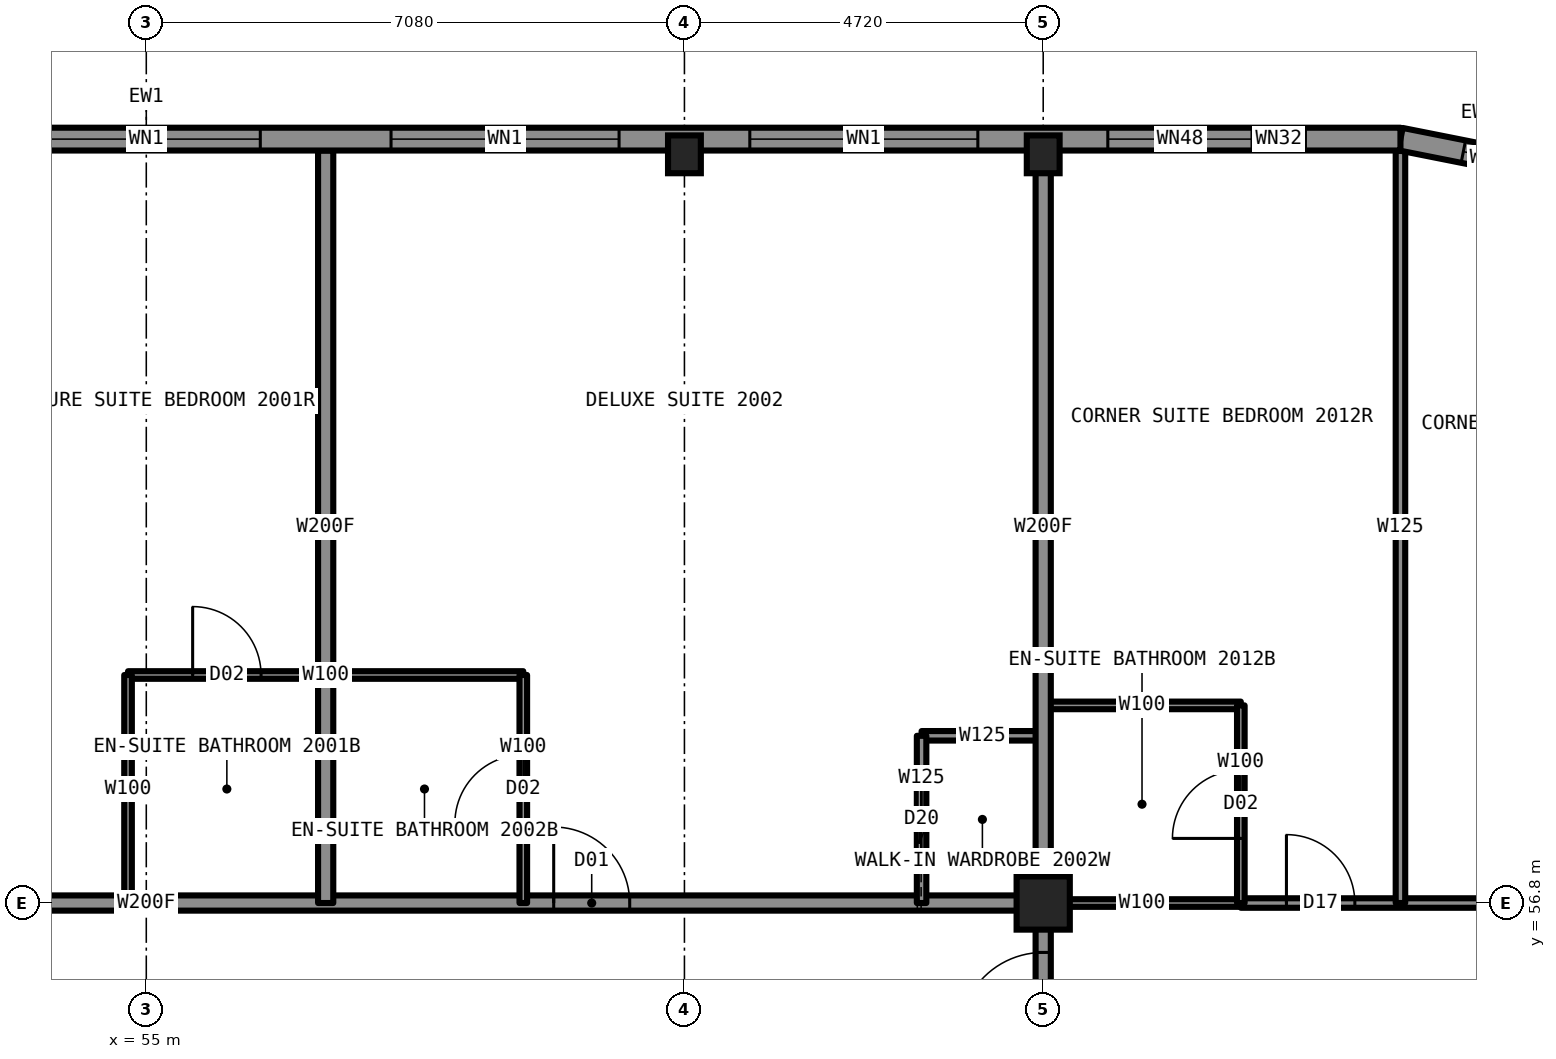
"""IFC4 building model, lengths in metres.
Left out: names, types, materials, properties, quantities, classifications, styles, units other than length and angle.
Written with IfcOpenShell. Run it as: python <this file> out.ifc"""

import sys

from ifc_helpers import new_model, si_unit, direction, frame, frame_2d, origin, origin_2d, place, context, subcontext, project, spatial, rectangle, hollow_rectangle, i_section, extrude, element, fill, save


model = new_model("IFC4")
c1 = context("Model", 3, precision=1e-05, world=origin(), true_north=direction((0.0, 1.0)))
c2 = subcontext(c1, "Body", "Model", "MODEL_VIEW")
j1 = project(units=[si_unit("LENGTHUNIT", "METRE"), si_unit("PLANEANGLEUNIT", "RADIAN")], contexts=[c1])
p1 = place(None, origin())
s1 = spatial("IfcSite", under=j1, at=p1, CompositionType="ELEMENT")
p2 = place(p1, origin())
s2 = spatial("IfcBuilding", under=s1, at=p2, CompositionType="ELEMENT")
p3 = place(p2, frame((0.0, 0.0, 70.5)))
s3 = spatial("IfcBuildingStorey", under=s2, at=p3, CompositionType="ELEMENT", Elevation=70.5)
for number, where, z_axis, x_axis in (
    (1, (62.08, 66.65, 0.0), (0.0, 0.0, 1.0), (1.0, 0.0, 0.0)),
    (2, (66.8, 66.65, 0.0), (0.0, 0.0, 1.0), (1.0, 0.0, 0.0)),
):
    element("IfcColumn", number, at=place(p3, frame(where, z_axis=z_axis, x_axis=x_axis)), inside=s3, PredefinedType="COLUMN", context=c2, shape_type="SweptSolid", body=[
        extrude(i_section(OverallWidth=0.432, OverallDepth=0.498, WebThickness=0.056, FlangeThickness=0.089, at=origin_2d()), origin(), (0.0, 0.0, 1.0), 3.5),
    ])
p4 = place(p3, frame((66.8, 56.8, 0.0), z_axis=(0.0, 0.0, 1.0), x_axis=(1.0, 0.0, 0.0)))
e3 = element("IfcColumn", 3, at=p4, inside=s3, PredefinedType="COLUMN", context=c2, shape_type="SweptSolid", body=[
    extrude(hollow_rectangle(XDim=0.7, YDim=0.7, WallThickness=0.06, at=origin_2d()), origin(), (0.0, 0.0, 1.0), 3.5),
])
p5 = place(p3, frame((66.8, 56.8, 0.0), z_axis=(0.0, 0.0, 1.0), x_axis=(1.0, 0.0, 0.0)))
e4 = element("IfcWall", 4, at=p5, inside=s3, PredefinedType="PARTITIONING", context=c2, shape_type="SweptSolid", body=[
    extrude(rectangle(XDim=2.6, YDim=0.1, at=frame_2d((1.3, 0.0))), origin(), (0.0, 0.0, 1.0), 2.573),
])
p6 = place(p3, frame((43.2, 56.8, 0.0), z_axis=(0.0, 0.0, 1.0), x_axis=(1.0, 0.0, 0.0)))
e5 = element("IfcWall", 5, at=p6, inside=s3, PredefinedType="PARTITIONING", context=c2, shape_type="SweptSolid", body=[
    extrude(rectangle(XDim=23.6, YDim=0.2, at=frame_2d((11.8, 0.0))), origin(), (0.0, 0.0, 1.0), 3.33),
])
p7 = place(p6, frame((1.85, 0.0, 0.0)))
e6 = element("IfcOpeningElement", 6, at=p7, cuts=e5, PredefinedType="OPENING", context=c2, shape_type="SweptSolid", body=[
    extrude(rectangle(XDim=1.1, YDim=2.2, at=frame_2d((0.55, 1.1))), frame((0.0, 0.11, 0.0), z_axis=(0.0, -1.0, 0.0), x_axis=(1.0, 0.0, 0.0)), (0.0, 0.0, 1.0), 0.22),
])
p8 = place(p6, frame((17.16, 0.0, 0.0)))
e7 = element("IfcOpeningElement", 7, at=p8, cuts=e5, PredefinedType="OPENING", context=c2, shape_type="SweptSolid", body=[
    extrude(rectangle(XDim=1.0, YDim=2.2, at=frame_2d((0.5, 1.1))), frame((0.0, 0.11, 0.0), z_axis=(0.0, -1.0, 0.0), x_axis=(1.0, 0.0, 0.0)), (0.0, 0.0, 1.0), 0.22),
])
p9 = place(p3, frame((69.4, 56.8, 0.0), z_axis=(0.0, 0.0, 1.0), x_axis=(1.0, 0.0, 0.0)))
e8 = element("IfcWall", 8, at=p9, inside=s3, PredefinedType="PARTITIONING", context=c2, shape_type="SweptSolid", body=[
    extrude(rectangle(XDim=7.3, YDim=0.125, at=frame_2d((3.65, 0.0))), origin(), (0.0, 0.0, 1.0), 2.573),
])
p10 = place(p9, frame((0.6, 0.0, 0.0)))
e9 = element("IfcOpeningElement", 9, at=p10, cuts=e8, PredefinedType="OPENING", context=c2, shape_type="SweptSolid", body=[
    extrude(rectangle(XDim=0.9, YDim=2.2, at=frame_2d((0.45, 1.1))), frame((0.0, 0.073, 0.0), z_axis=(0.0, -1.0, 0.0), x_axis=(1.0, 0.0, 0.0)), (0.0, 0.0, 1.0), 0.145),
])
p11 = place(p9, frame((4.4, 0.0, 0.0)))
e10 = element("IfcOpeningElement", 10, at=p11, cuts=e8, PredefinedType="OPENING", context=c2, shape_type="SweptSolid", body=[
    extrude(rectangle(XDim=0.9, YDim=2.2, at=frame_2d((0.45, 1.1))), frame((0.0, 0.073, 0.0), z_axis=(0.0, -1.0, 0.0), x_axis=(1.0, 0.0, 0.0)), (0.0, 0.0, 1.0), 0.145),
])
p12 = place(p3, frame((65.2, 59.0, 0.0), z_axis=(0.0, 0.0, 1.0), x_axis=(1.0, 0.0, 0.0)))
e11 = element("IfcWall", 11, at=p12, inside=s3, PredefinedType="PARTITIONING", context=c2, shape_type="SweptSolid", body=[
    extrude(rectangle(XDim=1.6, YDim=0.125, at=frame_2d((0.8, 0.0))), origin(), (0.0, 0.0, 1.0), 3.33),
])
p13 = place(p3, frame((66.8, 59.4, 0.0), z_axis=(0.0, 0.0, 1.0), x_axis=(1.0, 0.0, 0.0)))
e12 = element("IfcWall", 12, at=p13, inside=s3, PredefinedType="PARTITIONING", context=c2, shape_type="SweptSolid", body=[
    extrude(rectangle(XDim=2.6, YDim=0.1, at=frame_2d((1.3, 0.0))), origin(), (0.0, 0.0, 1.0), 3.33),
])
p14 = place(p3, frame((54.76, 59.8, 0.0), z_axis=(0.0, 0.0, 1.0), x_axis=(1.0, 0.0, 0.0)))
e13 = element("IfcWall", 13, at=p14, inside=s3, PredefinedType="PARTITIONING", context=c2, shape_type="SweptSolid", body=[
    extrude(rectangle(XDim=5.2, YDim=0.1, at=frame_2d((2.6, 0.0))), origin(), (0.0, 0.0, 1.0), 3.33),
])
p15 = place(p14, frame((0.85, 0.0, 0.0)))
e14 = element("IfcOpeningElement", 14, at=p15, cuts=e13, PredefinedType="OPENING", context=c2, shape_type="SweptSolid", body=[
    extrude(rectangle(XDim=0.9, YDim=2.1, at=frame_2d((0.45, 1.05))), frame((0.0, 0.06, 0.0), z_axis=(0.0, -1.0, 0.0), x_axis=(1.0, 0.0, 0.0)), (0.0, 0.0, 1.0), 0.12),
])
p16 = place(p3, frame((54.76, 56.8, 0.0), z_axis=(0.0, 0.0, 1.0), x_axis=(0.0, 1.0, 0.0)))
e15 = element("IfcWall", 15, at=p16, inside=s3, PredefinedType="PARTITIONING", context=c2, shape_type="SweptSolid", body=[
    extrude(rectangle(XDim=3.0, YDim=0.1, at=frame_2d((1.5, 0.0))), origin(), (0.0, 0.0, 1.0), 3.33),
])
p17 = place(p3, frame((65.2, 56.8, 0.0), z_axis=(0.0, 0.0, 1.0), x_axis=(0.0, 1.0, 0.0)))
e16 = element("IfcWall", 16, at=p17, inside=s3, PredefinedType="PARTITIONING", context=c2, shape_type="SweptSolid", body=[
    extrude(rectangle(XDim=2.2, YDim=0.125, at=frame_2d((1.1, 0.0))), origin(), (0.0, 0.0, 1.0), 3.33),
])
p18 = place(p17, frame((0.7, 0.0, 0.0)))
e17 = element("IfcOpeningElement", 17, at=p18, cuts=e16, PredefinedType="OPENING", context=c2, shape_type="SweptSolid", body=[
    extrude(rectangle(XDim=0.8, YDim=2.1, at=frame_2d((0.4, 1.05))), frame((0.0, 0.073, 0.0), z_axis=(0.0, -1.0, 0.0), x_axis=(1.0, 0.0, 0.0)), (0.0, 0.0, 1.0), 0.145),
])
p19 = place(p3, frame((66.8, 33.2, 0.0), z_axis=(0.0, 0.0, 1.0), x_axis=(0.0, 1.0, 0.0)))
e18 = element("IfcWall", 18, at=p19, inside=s3, PredefinedType="PARTITIONING", context=c2, shape_type="SweptSolid", body=[
    extrude(rectangle(XDim=23.6, YDim=0.2, at=frame_2d((11.8, 0.0))), origin(), (0.0, 0.0, 1.0), 3.33),
])
p20 = place(p19, frame((6.98, 0.0, 0.0)))
e19 = element("IfcOpeningElement", 19, at=p20, cuts=e18, PredefinedType="OPENING", context=c2, shape_type="SweptSolid", body=[
    extrude(rectangle(XDim=1.0, YDim=2.2, at=frame_2d((0.5, 1.1))), frame((0.0, 0.11, 0.0), z_axis=(0.0, -1.0, 0.0), x_axis=(1.0, 0.0, 0.0)), (0.0, 0.0, 1.0), 0.22),
])
p21 = place(p19, frame((12.44, 0.0, 0.0)))
e20 = element("IfcOpeningElement", 20, at=p21, cuts=e18, PredefinedType="OPENING", context=c2, shape_type="SweptSolid", body=[
    extrude(rectangle(XDim=1.0, YDim=2.2, at=frame_2d((0.5, 1.1))), frame((0.0, 0.11, 0.0), z_axis=(0.0, -1.0, 0.0), x_axis=(1.0, 0.0, 0.0)), (0.0, 0.0, 1.0), 0.22),
])
p22 = place(p19, frame((21.85, 0.0, 0.0)))
e21 = element("IfcOpeningElement", 21, at=p22, cuts=e18, PredefinedType="OPENING", context=c2, shape_type="SweptSolid", body=[
    extrude(rectangle(XDim=1.1, YDim=2.2, at=frame_2d((0.55, 1.1))), frame((0.0, 0.11, 0.0), z_axis=(0.0, -1.0, 0.0), x_axis=(1.0, 0.0, 0.0)), (0.0, 0.0, 1.0), 0.22),
])
p23 = place(p19, frame((0.66, 0.0, 0.0)))
e22 = element("IfcOpeningElement", 22, at=p23, cuts=e18, PredefinedType="OPENING", context=c2, shape_type="SweptSolid", body=[
    extrude(rectangle(XDim=1.1, YDim=2.2, at=frame_2d((0.55, 1.1))), frame((0.0, 0.11, 0.0), z_axis=(0.0, -1.0, 0.0), x_axis=(1.0, 0.0, 0.0)), (0.0, 0.0, 1.0), 0.22),
])
p24 = place(p3, frame((66.8, 56.8, 0.0), z_axis=(0.0, 0.0, 1.0), x_axis=(0.0, 1.0, 0.0)))
e23 = element("IfcWall", 23, at=p24, inside=s3, PredefinedType="PARTITIONING", context=c2, shape_type="SweptSolid", body=[
    extrude(rectangle(XDim=9.9, YDim=0.2, at=frame_2d((4.95, 0.0))), origin(), (0.0, 0.0, 1.0), 2.573),
])
p25 = place(p3, frame((69.4, 56.8, 0.0), z_axis=(0.0, 0.0, 1.0), x_axis=(0.0, 1.0, 0.0)))
e24 = element("IfcWall", 24, at=p25, inside=s3, PredefinedType="PARTITIONING", context=c2, shape_type="SweptSolid", body=[
    extrude(rectangle(XDim=2.6, YDim=0.1, at=frame_2d((1.3, 0.0))), origin(), (0.0, 0.0, 1.0), 3.33),
])
p26 = place(p25, frame((0.85, 0.0, 0.0)))
e25 = element("IfcOpeningElement", 25, at=p26, cuts=e24, PredefinedType="OPENING", context=c2, shape_type="SweptSolid", body=[
    extrude(rectangle(XDim=0.9, YDim=2.1, at=frame_2d((0.45, 1.05))), frame((0.0, 0.06, 0.0), z_axis=(0.0, -1.0, 0.0), x_axis=(1.0, 0.0, 0.0)), (0.0, 0.0, 1.0), 0.12),
])
p27 = place(p3, frame((71.5, 56.8, 0.0), z_axis=(0.0, 0.0, 1.0), x_axis=(0.0, 1.0, 0.0)))
e26 = element("IfcWall", 26, at=p27, inside=s3, PredefinedType="PARTITIONING", context=c2, shape_type="SweptSolid", body=[
    extrude(rectangle(XDim=9.894, YDim=0.125, at=frame_2d((4.947, 0.0))), origin(), (0.0, 0.0, 1.0), 3.33),
])
p28 = place(p3, frame((57.36, 56.8, 0.0), z_axis=(0.0, 0.0, 1.0), x_axis=(0.0, 1.0, 0.0)))
e27 = element("IfcWall", 27, at=p28, inside=s3, PredefinedType="PARTITIONING", context=c2, shape_type="SweptSolid", body=[
    extrude(rectangle(XDim=9.9, YDim=0.2, at=frame_2d((4.95, 0.0))), origin(), (0.0, 0.0, 1.0), 3.33),
])
p29 = place(p3, frame((59.96, 56.8, 0.0), z_axis=(0.0, 0.0, 1.0), x_axis=(0.0, 1.0, 0.0)))
e28 = element("IfcWall", 28, at=p29, inside=s3, PredefinedType="PARTITIONING", context=c2, shape_type="SweptSolid", body=[
    extrude(rectangle(XDim=3.0, YDim=0.1, at=frame_2d((1.5, 0.0))), origin(), (0.0, 0.0, 1.0), 3.33),
])
p30 = place(p29, frame((1.05, 0.0, 0.0)))
e29 = element("IfcOpeningElement", 29, at=p30, cuts=e28, PredefinedType="OPENING", context=c2, shape_type="SweptSolid", body=[
    extrude(rectangle(XDim=0.9, YDim=2.1, at=frame_2d((0.45, 1.05))), frame((0.0, 0.06, 0.0), z_axis=(0.0, -1.0, 0.0), x_axis=(1.0, 0.0, 0.0)), (0.0, 0.0, 1.0), 0.12),
])
p31 = place(p3, frame((73.547, 66.443, 0.0), z_axis=(0.0, 0.0, 1.0), x_axis=(-0.980787050784, 0.195081421501, 0.0)))
e30 = element("IfcWall", 30, at=p31, inside=s3, PredefinedType="SOLIDWALL", context=c2, shape_type="SweptSolid", body=[
    extrude(rectangle(XDim=2.087, YDim=0.3, at=frame_2d((1.044, 0.0))), origin(), (0.0, 0.0, 1.0), 3.33),
])
p32 = place(p31, frame((0.444, 0.0, 0.5)))
e31 = element("IfcOpeningElement", 31, at=p32, cuts=e30, PredefinedType="OPENING", context=c2, shape_type="SweptSolid", body=[
    extrude(rectangle(XDim=1.2, YDim=2.0, at=frame_2d((0.6, 1.0))), frame((0.0, 0.16, 0.0), z_axis=(0.0, -1.0, 0.0), x_axis=(1.0, 0.0, 0.0)), (0.0, 0.0, 1.0), 0.32),
])
p33 = place(p3, frame((71.5, 66.85, 0.0), z_axis=(0.0, 0.0, 1.0), x_axis=(-1.0, 0.0, 0.0)))
e32 = element("IfcWall", 32, at=p33, inside=s3, PredefinedType="SOLIDWALL", context=c2, shape_type="SweptSolid", body=[
    extrude(rectangle(XDim=33.0, YDim=0.3, at=frame_2d((16.5, 0.0))), origin(), (0.0, 0.0, 1.0), 2.83),
])
p34 = place(p33, frame((0.85, 0.0, 0.5)))
e33 = element("IfcOpeningElement", 33, at=p34, cuts=e32, PredefinedType="OPENING", context=c2, shape_type="SweptSolid", body=[
    extrude(rectangle(XDim=2.9, YDim=2.0, at=frame_2d((1.45, 1.0))), frame((0.0, 0.16, 0.0), z_axis=(0.0, -1.0, 0.0), x_axis=(1.0, 0.0, 0.0)), (0.0, 0.0, 1.0), 0.32),
])
p35 = place(p33, frame((6.96, 0.0, 0.55)))
e34 = element("IfcOpeningElement", 34, at=p35, cuts=e32, PredefinedType="OPENING", context=c2, shape_type="SweptSolid", body=[
    extrude(rectangle(XDim=1.6, YDim=1.9, at=frame_2d((0.8, 0.95))), frame((0.0, 0.16, 0.0), z_axis=(0.0, -1.0, 0.0), x_axis=(1.0, 0.0, 0.0)), (0.0, 0.0, 1.0), 0.32),
])
p36 = place(p33, frame((10.28, 0.0, 0.5)))
e35 = element("IfcOpeningElement", 35, at=p36, cuts=e32, PredefinedType="OPENING", context=c2, shape_type="SweptSolid", body=[
    extrude(rectangle(XDim=3.0, YDim=2.0, at=frame_2d((1.5, 1.0))), frame((0.0, 0.16, 0.0), z_axis=(0.0, -1.0, 0.0), x_axis=(1.0, 0.0, 0.0)), (0.0, 0.0, 1.0), 0.32),
])
p37 = place(p33, frame((15.0, 0.0, 0.5)))
e36 = element("IfcOpeningElement", 36, at=p37, cuts=e32, PredefinedType="OPENING", context=c2, shape_type="SweptSolid", body=[
    extrude(rectangle(XDim=3.0, YDim=2.0, at=frame_2d((1.5, 1.0))), frame((0.0, 0.16, 0.0), z_axis=(0.0, -1.0, 0.0), x_axis=(1.0, 0.0, 0.0)), (0.0, 0.0, 1.0), 0.32),
])
p38 = place(p33, frame((19.72, 0.0, 0.5)))
e37 = element("IfcOpeningElement", 37, at=p38, cuts=e32, PredefinedType="OPENING", context=c2, shape_type="SweptSolid", body=[
    extrude(rectangle(XDim=3.0, YDim=2.0, at=frame_2d((1.5, 1.0))), frame((0.0, 0.16, 0.0), z_axis=(0.0, -1.0, 0.0), x_axis=(1.0, 0.0, 0.0)), (0.0, 0.0, 1.0), 0.32),
])
p39 = place(p33, frame((24.44, 0.0, 0.55)))
e38 = element("IfcOpeningElement", 38, at=p39, cuts=e32, PredefinedType="OPENING", context=c2, shape_type="SweptSolid", body=[
    extrude(rectangle(XDim=1.6, YDim=1.9, at=frame_2d((0.8, 0.95))), frame((0.0, 0.16, 0.0), z_axis=(0.0, -1.0, 0.0), x_axis=(1.0, 0.0, 0.0)), (0.0, 0.0, 1.0), 0.32),
])
p40 = place(p33, frame((29.25, 0.0, 0.5)))
e39 = element("IfcOpeningElement", 39, at=p40, cuts=e32, PredefinedType="OPENING", context=c2, shape_type="SweptSolid", body=[
    extrude(rectangle(XDim=2.9, YDim=2.0, at=frame_2d((1.45, 1.0))), frame((0.0, 0.16, 0.0), z_axis=(0.0, -1.0, 0.0), x_axis=(1.0, 0.0, 0.0)), (0.0, 0.0, 1.0), 0.32),
])
p41 = place(p33, frame((6.31, 0.0, 1.45)))
e40 = element("IfcOpeningElement", 40, at=p41, cuts=e32, PredefinedType="OPENING", context=c2, shape_type="SweptSolid", body=[
    extrude(rectangle(XDim=0.6, YDim=1.0, at=frame_2d((0.3, 0.5))), frame((0.0, 0.16, 0.0), z_axis=(0.0, -1.0, 0.0), x_axis=(1.0, 0.0, 0.0)), (0.0, 0.0, 1.0), 0.32),
])
p42 = place(p33, frame((26.04, 0.0, 1.45)))
e41 = element("IfcOpeningElement", 41, at=p42, cuts=e32, PredefinedType="OPENING", context=c2, shape_type="SweptSolid", body=[
    extrude(rectangle(XDim=0.6, YDim=1.0, at=frame_2d((0.3, 0.5))), frame((0.0, 0.16, 0.0), z_axis=(0.0, -1.0, 0.0), x_axis=(1.0, 0.0, 0.0)), (0.0, 0.0, 1.0), 0.32),
])
p43 = place(p15, origin())
e42 = element("IfcDoor", 42, at=p43, inside=s3, OperationType="SINGLE_SWING_RIGHT", PredefinedType="DOOR", context=c2, shape_type="SweptSolid", body=[
    extrude(rectangle(XDim=0.9, YDim=2.1, at=frame_2d((0.45, 1.05))), frame((0.0, 0.025, 0.0), z_axis=(0.0, -1.0, 0.0), x_axis=(1.0, 0.0, 0.0)), (0.0, 0.0, 1.0), 0.05),
])
fill(e14, e42)
p44 = place(p8, origin())
e43 = element("IfcDoor", 43, at=p44, inside=s3, OperationType="SINGLE_SWING_LEFT", PredefinedType="DOOR", context=c2, shape_type="SweptSolid", body=[
    extrude(rectangle(XDim=1.0, YDim=2.2, at=frame_2d((0.5, 1.1))), frame((0.0, 0.025, 0.0), z_axis=(0.0, -1.0, 0.0), x_axis=(1.0, 0.0, 0.0)), (0.0, 0.0, 1.0), 0.05),
])
fill(e7, e43)
p45 = place(p30, origin())
e44 = element("IfcDoor", 44, at=p45, inside=s3, OperationType="SINGLE_SWING_RIGHT", PredefinedType="DOOR", context=c2, shape_type="SweptSolid", body=[
    extrude(rectangle(XDim=0.9, YDim=2.1, at=frame_2d((0.45, 1.05))), frame((0.0, 0.025, 0.0), z_axis=(0.0, -1.0, 0.0), x_axis=(1.0, 0.0, 0.0)), (0.0, 0.0, 1.0), 0.05),
])
fill(e29, e44)
p46 = place(p18, origin())
e45 = element("IfcDoor", 45, at=p46, inside=s3, OperationType="SLIDING_TO_LEFT", PredefinedType="DOOR", context=c2, shape_type="SweptSolid", body=[
    extrude(rectangle(XDim=0.8, YDim=2.1, at=frame_2d((0.4, 1.05))), frame((0.0, 0.025, 0.0), z_axis=(0.0, -1.0, 0.0), x_axis=(1.0, 0.0, 0.0)), (0.0, 0.0, 1.0), 0.05),
])
fill(e17, e45)
p47 = place(p22, origin())
e46 = element("IfcDoor", 46, at=p47, inside=s3, OperationType="SINGLE_SWING_LEFT", PredefinedType="DOOR", context=c2, shape_type="SweptSolid", body=[
    extrude(rectangle(XDim=1.1, YDim=2.2, at=frame_2d((0.55, 1.1))), frame((0.0, 0.025, 0.0), z_axis=(0.0, -1.0, 0.0), x_axis=(1.0, 0.0, 0.0)), (0.0, 0.0, 1.0), 0.05),
])
fill(e21, e46)
p48 = place(p26, origin())
e47 = element("IfcDoor", 47, at=p48, inside=s3, OperationType="SINGLE_SWING_RIGHT", PredefinedType="DOOR", context=c2, shape_type="SweptSolid", body=[
    extrude(rectangle(XDim=0.9, YDim=2.1, at=frame_2d((0.45, 1.05))), frame((0.0, 0.025, 0.0), z_axis=(0.0, -1.0, 0.0), x_axis=(1.0, 0.0, 0.0)), (0.0, 0.0, 1.0), 0.05),
])
fill(e25, e47)
p49 = place(p10, origin())
e48 = element("IfcDoor", 48, at=p49, inside=s3, OperationType="SINGLE_SWING_LEFT", PredefinedType="DOOR", context=c2, shape_type="SweptSolid", body=[
    extrude(rectangle(XDim=0.9, YDim=2.2, at=frame_2d((0.45, 1.1))), frame((0.0, 0.025, 0.0), z_axis=(0.0, -1.0, 0.0), x_axis=(1.0, 0.0, 0.0)), (0.0, 0.0, 1.0), 0.05),
])
fill(e9, e48)
p50 = place(p32, origin())
e49 = element("IfcWindow", 49, at=p50, inside=s3, PartitioningType="SINGLE_PANEL", PredefinedType="WINDOW", context=c2, shape_type="SweptSolid", body=[
    extrude(rectangle(XDim=1.2, YDim=2.0, at=frame_2d((0.6, 1.0))), frame((0.0, 0.03, 0.0), z_axis=(0.0, -1.0, 0.0), x_axis=(1.0, 0.0, 0.0)), (0.0, 0.0, 1.0), 0.06),
])
fill(e31, e49)
p51 = place(p34, origin())
e50 = element("IfcWindow", 50, at=p51, inside=s3, PartitioningType="SINGLE_PANEL", PredefinedType="WINDOW", context=c2, shape_type="SweptSolid", body=[
    extrude(rectangle(XDim=2.9, YDim=2.0, at=frame_2d((1.45, 1.0))), frame((0.0, 0.03, 0.0), z_axis=(0.0, -1.0, 0.0), x_axis=(1.0, 0.0, 0.0)), (0.0, 0.0, 1.0), 0.06),
])
fill(e33, e50)
p52 = place(p35, origin())
e51 = element("IfcWindow", 51, at=p52, inside=s3, PartitioningType="SINGLE_PANEL", PredefinedType="WINDOW", context=c2, shape_type="SweptSolid", body=[
    extrude(rectangle(XDim=1.6, YDim=1.9, at=frame_2d((0.8, 0.95))), frame((0.0, 0.03, 0.0), z_axis=(0.0, -1.0, 0.0), x_axis=(1.0, 0.0, 0.0)), (0.0, 0.0, 1.0), 0.06),
])
fill(e34, e51)
p53 = place(p36, origin())
e52 = element("IfcWindow", 52, at=p53, inside=s3, PartitioningType="SINGLE_PANEL", PredefinedType="WINDOW", context=c2, shape_type="SweptSolid", body=[
    extrude(rectangle(XDim=3.0, YDim=2.0, at=frame_2d((1.5, 1.0))), frame((0.0, 0.03, 0.0), z_axis=(0.0, -1.0, 0.0), x_axis=(1.0, 0.0, 0.0)), (0.0, 0.0, 1.0), 0.06),
])
fill(e35, e52)
p54 = place(p37, origin())
e53 = element("IfcWindow", 53, at=p54, inside=s3, PartitioningType="SINGLE_PANEL", PredefinedType="WINDOW", context=c2, shape_type="SweptSolid", body=[
    extrude(rectangle(XDim=3.0, YDim=2.0, at=frame_2d((1.5, 1.0))), frame((0.0, 0.03, 0.0), z_axis=(0.0, -1.0, 0.0), x_axis=(1.0, 0.0, 0.0)), (0.0, 0.0, 1.0), 0.06),
])
fill(e36, e53)
p55 = place(p41, origin())
e54 = element("IfcWindow", 54, at=p55, inside=s3, PartitioningType="SINGLE_PANEL", PredefinedType="WINDOW", context=c2, shape_type="SweptSolid", body=[
    extrude(rectangle(XDim=0.6, YDim=1.0, at=frame_2d((0.3, 0.5))), frame((0.0, 0.03, 0.0), z_axis=(0.0, -1.0, 0.0), x_axis=(1.0, 0.0, 0.0)), (0.0, 0.0, 1.0), 0.06),
])
fill(e40, e54)
save(model, sys.argv[1])
